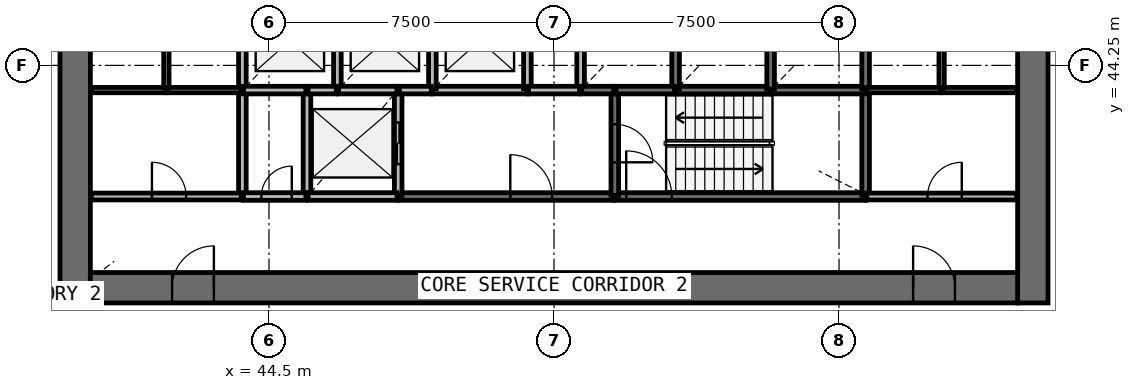
"""IFC4 building model, lengths in metres.
Left out: names, types, materials, properties, quantities, classifications, styles, units other than length and angle.
Written with IfcOpenShell. Run it as: python <this file> out.ifc"""

import sys

from ifc_helpers import new_model, si_unit, direction, frame, frame_2d, origin, place, context, subcontext, project, spatial, rectangle, extrude, source, transform, mapped, element, fill, save


model = new_model("IFC4")
c1 = context("Model", 3, precision=1e-05, world=origin(), true_north=direction((0.0, 1.0)))
c2 = subcontext(c1, "Body", "Model", "MODEL_VIEW")
j1 = project(units=[si_unit("LENGTHUNIT", "METRE"), si_unit("PLANEANGLEUNIT", "RADIAN")], contexts=[c1])
p1 = place(None, origin())
s1 = spatial("IfcSite", under=j1, at=p1, CompositionType="ELEMENT")
p2 = place(p1, origin())
s2 = spatial("IfcBuilding", under=s1, at=p2, CompositionType="ELEMENT")
p3 = place(p2, frame((0.0, 0.0, 79.8)))
s3 = spatial("IfcBuildingStorey", under=s2, at=p3, CompositionType="ELEMENT", Elevation=79.8)
p4 = place(p3, frame((64.6, 38.0, 0.0), z_axis=(0.0, 0.0, 1.0), x_axis=(0.0, 1.0, 0.0)))
e1 = element("IfcWall", 1, at=p4, inside=s3, PredefinedType="SHEAR", context=c2, shape_type="SweptSolid", body=[
    extrude(rectangle(XDim=20.0, YDim=0.8, at=frame_2d((10.0, 0.0))), origin(), (0.0, 0.0, 1.0), 4.1),
])
p5 = place(p4, frame((9.1, 0.0, 0.0)))
e2 = element("IfcOpeningElement", 2, at=p5, cuts=e1, PredefinedType="OPENING", context=c2, shape_type="SweptSolid", body=[
    extrude(rectangle(XDim=1.8, YDim=2.1, at=frame_2d((0.9, 1.05))), frame((0.0, 0.41, 0.0), z_axis=(0.0, -1.0, 0.0), x_axis=(1.0, 0.0, 0.0)), (0.0, 0.0, 1.0), 0.82),
])
p6 = place(p3, frame((39.4, 58.0, 0.0), z_axis=(0.0, 0.0, 1.0), x_axis=(0.0, -1.0, 0.0)))
e3 = element("IfcWall", 3, at=p6, inside=s3, PredefinedType="SHEAR", context=c2, shape_type="SweptSolid", body=[
    extrude(rectangle(XDim=20.0, YDim=0.8, at=frame_2d((10.0, 0.0))), origin(), (0.0, 0.0, 1.0), 4.1),
])
p7 = place(p6, frame((9.1, 0.0, 0.0)))
e4 = element("IfcOpeningElement", 4, at=p7, cuts=e3, PredefinedType="OPENING", context=c2, shape_type="SweptSolid", body=[
    extrude(rectangle(XDim=1.8, YDim=2.1, at=frame_2d((0.9, 1.05))), frame((0.0, 0.41, 0.0), z_axis=(0.0, -1.0, 0.0), x_axis=(1.0, 0.0, 0.0)), (0.0, 0.0, 1.0), 0.82),
])
p8 = place(p3, frame((39.8, 38.4, 0.0), z_axis=(0.0, 0.0, 1.0), x_axis=(1.0, 0.0, 0.0)))
e5 = element("IfcWall", 5, at=p8, inside=s3, PredefinedType="SHEAR", context=c2, shape_type="SweptSolid", body=[
    extrude(rectangle(XDim=24.4, YDim=0.8, at=frame_2d((12.2, 0.0))), origin(), (0.0, 0.0, 1.0), 4.1),
])
p9 = place(p8, frame((21.65, 0.0, 0.0)))
e6 = element("IfcOpeningElement", 6, at=p9, cuts=e5, PredefinedType="OPENING", context=c2, shape_type="SweptSolid", body=[
    extrude(rectangle(XDim=1.1, YDim=2.1, at=frame_2d((0.55, 1.05))), frame((0.0, 0.41, 0.0), z_axis=(0.0, -1.0, 0.0), x_axis=(1.0, 0.0, 0.0)), (0.0, 0.0, 1.0), 0.82),
])
p10 = place(p8, frame((2.15, 0.0, 0.0)))
e7 = element("IfcOpeningElement", 7, at=p10, cuts=e5, PredefinedType="OPENING", context=c2, shape_type="SweptSolid", body=[
    extrude(rectangle(XDim=1.1, YDim=2.1, at=frame_2d((0.55, 1.05))), frame((0.0, 0.41, 0.0), z_axis=(0.0, -1.0, 0.0), x_axis=(1.0, 0.0, 0.0)), (0.0, 0.0, 1.0), 0.82),
])
p11 = place(p3, frame((53.6, 40.8, 0.0), z_axis=(0.0, 0.0, 1.0), x_axis=(1.0, 0.0, 0.0)))
e8 = element("IfcWall", 8, at=p11, inside=s3, PredefinedType="SOLIDWALL", context=c2, shape_type="SweptSolid", body=[
    extrude(rectangle(XDim=6.6, YDim=0.2, at=frame_2d((3.3, 0.0))), origin(), (0.0, 0.0, 1.0), 3.7),
])
p12 = place(p11, frame((0.3, 0.0, 0.0)))
e9 = element("IfcOpeningElement", 9, at=p12, cuts=e8, PredefinedType="OPENING", context=c2, shape_type="SweptSolid", body=[
    extrude(rectangle(XDim=1.2, YDim=2.1, at=frame_2d((0.6, 1.05))), frame((0.0, 0.11, 0.0), z_axis=(0.0, -1.0, 0.0), x_axis=(1.0, 0.0, 0.0)), (0.0, 0.0, 1.0), 0.22),
])
p13 = place(p3, frame((47.9, 40.8, 0.0), z_axis=(0.0, 0.0, 1.0), x_axis=(1.0, 0.0, 0.0)))
e10 = element("IfcWall", 10, at=p13, inside=s3, PredefinedType="SOLIDWALL", context=c2, shape_type="SweptSolid", body=[
    extrude(rectangle(XDim=5.67, YDim=0.2, at=frame_2d((2.835, 0.0))), origin(), (0.0, 0.0, 1.0), 3.7),
])
p14 = place(p13, frame((2.95, 0.0, 0.0)))
e11 = element("IfcOpeningElement", 11, at=p14, cuts=e10, PredefinedType="OPENING", context=c2, shape_type="SweptSolid", body=[
    extrude(rectangle(XDim=1.1, YDim=2.1, at=frame_2d((0.55, 1.05))), frame((0.0, 0.11, 0.0), z_axis=(0.0, -1.0, 0.0), x_axis=(1.0, 0.0, 0.0)), (0.0, 0.0, 1.0), 0.22),
])
for number, where, z_axis, x_axis in (
    (12, (43.8, 43.6, 0.0), (0.0, 0.0, 1.0), (0.0, -1.0, 0.0)),
    (13, (45.5, 43.6, 0.0), (0.0, 0.0, 1.0), (0.0, -1.0, 0.0)),
):
    element("IfcWall", number, at=place(p3, frame(where, z_axis=z_axis, x_axis=x_axis)), inside=s3, PredefinedType="SOLIDWALL", context=c2, shape_type="SweptSolid", body=[
        extrude(rectangle(XDim=2.8, YDim=0.2, at=frame_2d((1.4, 0.0))), origin(), (0.0, 0.0, 1.0), 3.7),
    ])
p15 = place(p3, frame((47.9, 40.83, 0.0), z_axis=(0.0, 0.0, 1.0), x_axis=(0.0, 1.0, 0.0)))
e14 = element("IfcWall", 14, at=p15, inside=s3, PredefinedType="SOLIDWALL", context=c2, shape_type="SweptSolid", body=[
    extrude(rectangle(XDim=2.77, YDim=0.2, at=frame_2d((1.385, 0.0))), origin(), (0.0, 0.0, 1.0), 3.7),
])
p16 = place(p15, frame((0.82, 0.0, 0.0)))
e15 = element("IfcOpeningElement", 15, at=p16, cuts=e14, PredefinedType="OPENING", context=c2, shape_type="SweptSolid", body=[
    extrude(rectangle(XDim=1.1, YDim=2.1, at=frame_2d((0.55, 1.05))), frame((0.0, 0.11, 0.0), z_axis=(0.0, -1.0, 0.0), x_axis=(1.0, 0.0, 0.0)), (0.0, 0.0, 1.0), 0.22),
])
p17 = place(p3, frame((60.2, 40.83, 0.0), z_axis=(0.0, 0.0, 1.0), x_axis=(0.0, 1.0, 0.0)))
e16 = element("IfcWall", 16, at=p17, inside=s3, PredefinedType="SOLIDWALL", context=c2, shape_type="SweptSolid", body=[
    extrude(rectangle(XDim=2.77, YDim=0.2, at=frame_2d((1.385, 0.0))), origin(), (0.0, 0.0, 1.0), 3.7),
])
p18 = place(p3, frame((53.6, 43.6, 0.0), z_axis=(0.0, 0.0, 1.0), x_axis=(0.0, -1.0, 0.0)))
e17 = element("IfcWall", 17, at=p18, inside=s3, PredefinedType="SOLIDWALL", context=c2, shape_type="SweptSolid", body=[
    extrude(rectangle(XDim=2.77, YDim=0.2, at=frame_2d((1.385, 0.0))), origin(), (0.0, 0.0, 1.0), 3.7),
])
p19 = place(p18, frame((0.9, 0.0, 0.0)))
e18 = element("IfcOpeningElement", 18, at=p19, cuts=e17, PredefinedType="OPENING", context=c2, shape_type="SweptSolid", body=[
    extrude(rectangle(XDim=1.0, YDim=2.1, at=frame_2d((0.5, 1.05))), frame((0.0, 0.11, 0.0), z_axis=(0.0, -1.0, 0.0), x_axis=(1.0, 0.0, 0.0)), (0.0, 0.0, 1.0), 0.22),
])
for number, where, z_axis, x_axis in (
    (19, (48.8, 43.6, 0.0), (0.0, 0.0, 1.0), (1.0, 0.0, 0.0)),
    (20, (55.2, 43.6, 0.0), (0.0, 0.0, 1.0), (1.0, 0.0, 0.0)),
):
    element("IfcWall", number, at=place(p3, frame(where, z_axis=z_axis, x_axis=x_axis)), inside=s3, PredefinedType="SOLIDWALL", context=c2, shape_type="SweptSolid", body=[
        extrude(rectangle(XDim=2.5, YDim=0.2, at=frame_2d((1.25, 0.0))), origin(), (0.0, 0.0, 1.0), 3.7),
    ])
p20 = place(p3, frame((57.73, 43.6, 0.0), z_axis=(0.0, 0.0, 1.0), x_axis=(1.0, 0.0, 0.0)))
e21 = element("IfcWall", 21, at=p20, inside=s3, PredefinedType="SOLIDWALL", context=c2, shape_type="SweptSolid", body=[
    extrude(rectangle(XDim=2.44, YDim=0.2, at=frame_2d((1.22, 0.0))), origin(), (0.0, 0.0, 1.0), 3.7),
])
p21 = place(p3, frame((45.53, 40.8, 0.0), z_axis=(0.0, 0.0, 1.0), x_axis=(1.0, 0.0, 0.0)))
e22 = element("IfcWall", 22, at=p21, inside=s3, PredefinedType="SOLIDWALL", context=c2, shape_type="SweptSolid", body=[
    extrude(rectangle(XDim=2.34, YDim=0.2, at=frame_2d((1.17, 0.0))), origin(), (0.0, 0.0, 1.0), 3.7),
])
p22 = place(p3, frame((43.8, 45.99, 0.0), z_axis=(0.0, 0.0, 1.0), x_axis=(0.0, -1.0, 0.0)))
e23 = element("IfcWall", 23, at=p22, inside=s3, PredefinedType="SOLIDWALL", context=c2, shape_type="SweptSolid", body=[
    extrude(rectangle(XDim=2.36, YDim=0.2, at=frame_2d((1.18, 0.0))), origin(), (0.0, 0.0, 1.0), 3.7),
])
p23 = place(p3, frame((46.3, 43.6, 0.0), z_axis=(0.0, 0.0, 1.0), x_axis=(0.0, 1.0, 0.0)))
e24 = element("IfcWall", 24, at=p23, inside=s3, PredefinedType="SOLIDWALL", context=c2, shape_type="SweptSolid", body=[
    extrude(rectangle(XDim=2.39, YDim=0.2, at=frame_2d((1.195, 0.0))), origin(), (0.0, 0.0, 1.0), 3.7),
])
for number, where, z_axis, x_axis in (
    (25, (48.8, 43.63, 0.0), (0.0, 0.0, 1.0), (0.0, 1.0, 0.0)),
    (26, (51.3, 43.63, 0.0), (0.0, 0.0, 1.0), (0.0, 1.0, 0.0)),
):
    element("IfcWall", number, at=place(p3, frame(where, z_axis=z_axis, x_axis=x_axis)), inside=s3, PredefinedType="SOLIDWALL", context=c2, shape_type="SweptSolid", body=[
        extrude(rectangle(XDim=2.36, YDim=0.2, at=frame_2d((1.18, 0.0))), origin(), (0.0, 0.0, 1.0), 3.7),
    ])
p24 = place(p3, frame((52.7, 45.99, 0.0), z_axis=(0.0, 0.0, 1.0), x_axis=(0.0, -1.0, 0.0)))
e27 = element("IfcWall", 27, at=p24, inside=s3, PredefinedType="SOLIDWALL", context=c2, shape_type="SweptSolid", body=[
    extrude(rectangle(XDim=2.39, YDim=0.2, at=frame_2d((1.195, 0.0))), origin(), (0.0, 0.0, 1.0), 3.7),
])
for number, where, z_axis, x_axis in (
    (28, (55.2, 43.63, 0.0), (0.0, 0.0, 1.0), (0.0, 1.0, 0.0)),
    (29, (57.7, 43.63, 0.0), (0.0, 0.0, 1.0), (0.0, 1.0, 0.0)),
    (30, (60.2, 43.63, 0.0), (0.0, 0.0, 1.0), (0.0, 1.0, 0.0)),
):
    element("IfcWall", number, at=place(p3, frame(where, z_axis=z_axis, x_axis=x_axis)), inside=s3, PredefinedType="SOLIDWALL", context=c2, shape_type="SweptSolid", body=[
        extrude(rectangle(XDim=2.36, YDim=0.2, at=frame_2d((1.18, 0.0))), origin(), (0.0, 0.0, 1.0), 3.7),
    ])
p25 = place(p3, frame((43.83, 43.6, 0.0), z_axis=(0.0, 0.0, 1.0), x_axis=(1.0, 0.0, 0.0)))
e31 = element("IfcWall", 31, at=p25, inside=s3, PredefinedType="SOLIDWALL", context=c2, shape_type="SweptSolid", body=[
    extrude(rectangle(XDim=1.64, YDim=0.2, at=frame_2d((0.82, 0.0))), origin(), (0.0, 0.0, 1.0), 3.7),
])
p26 = place(p3, frame((43.83, 40.8, 0.0), z_axis=(0.0, 0.0, 1.0), x_axis=(1.0, 0.0, 0.0)))
e32 = element("IfcWall", 32, at=p26, inside=s3, PredefinedType="SOLIDWALL", context=c2, shape_type="SweptSolid", body=[
    extrude(rectangle(XDim=1.64, YDim=0.2, at=frame_2d((0.82, 0.0))), origin(), (0.0, 0.0, 1.0), 3.7),
])
p27 = place(p26, frame((0.47, 0.0, 0.0)))
e33 = element("IfcOpeningElement", 33, at=p27, cuts=e32, PredefinedType="OPENING", context=c2, shape_type="SweptSolid", body=[
    extrude(rectangle(XDim=0.8, YDim=2.1, at=frame_2d((0.4, 1.05))), frame((0.0, 0.11, 0.0), z_axis=(0.0, -1.0, 0.0), x_axis=(1.0, 0.0, 0.0)), (0.0, 0.0, 1.0), 0.22),
])
for number, where, z_axis, x_axis in (
    (34, (46.33, 43.6, 0.0), (0.0, 0.0, 1.0), (1.0, 0.0, 0.0)),
    (35, (53.63, 43.6, 0.0), (0.0, 0.0, 1.0), (1.0, 0.0, 0.0)),
):
    element("IfcWall", number, at=place(p3, frame(where, z_axis=z_axis, x_axis=x_axis)), inside=s3, PredefinedType="SOLIDWALL", context=c2, shape_type="SweptSolid", body=[
        extrude(rectangle(XDim=1.54, YDim=0.2, at=frame_2d((0.77, 0.0))), origin(), (0.0, 0.0, 1.0), 3.7),
    ])
p28 = place(p3, frame((52.67, 43.6, 0.0), z_axis=(0.0, 0.0, 1.0), x_axis=(-1.0, 0.0, 0.0)))
e36 = element("IfcWall", 36, at=p28, inside=s3, PredefinedType="SOLIDWALL", context=c2, shape_type="SweptSolid", body=[
    extrude(rectangle(XDim=1.34, YDim=0.2, at=frame_2d((0.67, 0.0))), origin(), (0.0, 0.0, 1.0), 3.7),
])
for number, where, z_axis, x_axis in (
    (37, (47.93, 43.6, 0.0), (0.0, 0.0, 1.0), (1.0, 0.0, 0.0)),
    (38, (52.73, 43.6, 0.0), (0.0, 0.0, 1.0), (1.0, 0.0, 0.0)),
):
    element("IfcWall", number, at=place(p3, frame(where, z_axis=z_axis, x_axis=x_axis)), inside=s3, PredefinedType="SOLIDWALL", context=c2, shape_type="SweptSolid", body=[
        extrude(rectangle(XDim=0.84, YDim=0.2, at=frame_2d((0.42, 0.0))), origin(), (0.0, 0.0, 1.0), 3.7),
    ])
p29 = place(p3, frame((45.53, 43.6, 0.0), z_axis=(0.0, 0.0, 1.0), x_axis=(1.0, 0.0, 0.0)))
e39 = element("IfcWall", 39, at=p29, inside=s3, PredefinedType="SOLIDWALL", context=c2, shape_type="SweptSolid", body=[
    extrude(rectangle(XDim=0.74, YDim=0.2, at=frame_2d((0.37, 0.0))), origin(), (0.0, 0.0, 1.0), 3.7),
])
p30 = place(p3, frame((60.23, 40.8, 0.0), z_axis=(0.0, 0.0, 1.0), x_axis=(1.0, 0.0, 0.0)))
e40 = element("IfcWall", 40, at=p30, inside=s3, PredefinedType="PARTITIONING", context=c2, shape_type="SweptSolid", body=[
    extrude(rectangle(XDim=3.95, YDim=0.18, at=frame_2d((1.975, 0.0))), origin(), (0.0, 0.0, 1.0), 3.7),
])
p31 = place(p30, frame((1.6, 0.0, 0.0)))
e41 = element("IfcOpeningElement", 41, at=p31, cuts=e40, PredefinedType="OPENING", context=c2, shape_type="SweptSolid", body=[
    extrude(rectangle(XDim=0.9, YDim=2.1, at=frame_2d((0.45, 1.05))), frame((0.0, 0.1, 0.0), z_axis=(0.0, -1.0, 0.0), x_axis=(1.0, 0.0, 0.0)), (0.0, 0.0, 1.0), 0.2),
])
p32 = place(p3, frame((39.82, 40.8, 0.0), z_axis=(0.0, 0.0, 1.0), x_axis=(1.0, 0.0, 0.0)))
e42 = element("IfcWall", 42, at=p32, inside=s3, PredefinedType="PARTITIONING", context=c2, shape_type="SweptSolid", body=[
    extrude(rectangle(XDim=3.95, YDim=0.18, at=frame_2d((1.975, 0.0))), origin(), (0.0, 0.0, 1.0), 3.7),
])
p33 = place(p32, frame((1.6, 0.0, 0.0)))
e43 = element("IfcOpeningElement", 43, at=p33, cuts=e42, PredefinedType="OPENING", context=c2, shape_type="SweptSolid", body=[
    extrude(rectangle(XDim=0.9, YDim=2.1, at=frame_2d((0.45, 1.05))), frame((0.0, 0.1, 0.0), z_axis=(0.0, -1.0, 0.0), x_axis=(1.0, 0.0, 0.0)), (0.0, 0.0, 1.0), 0.2),
])
for number, where, z_axis, x_axis in (
    (44, (41.8, 43.6, 0.0), (0.0, 0.0, 1.0), (0.0, 1.0, 0.0)),
    (45, (62.2, 43.6, 0.0), (0.0, 0.0, 1.0), (0.0, 1.0, 0.0)),
):
    element("IfcWall", number, at=place(p3, frame(where, z_axis=z_axis, x_axis=x_axis)), inside=s3, PredefinedType="PARTITIONING", context=c2, shape_type="SweptSolid", body=[
        extrude(rectangle(XDim=2.39, YDim=0.14, at=frame_2d((1.195, 0.0))), origin(), (0.0, 0.0, 1.0), 2.9),
    ])
for number, where, z_axis, x_axis in (
    (46, (43.77, 43.6, 0.0), (0.0, 0.0, 1.0), (-1.0, 0.0, 0.0)),
    (47, (60.23, 43.6, 0.0), (0.0, 0.0, 1.0), (1.0, 0.0, 0.0)),
):
    element("IfcWall", number, at=place(p3, frame(where, z_axis=z_axis, x_axis=x_axis)), inside=s3, PredefinedType="PARTITIONING", context=c2, shape_type="SweptSolid", body=[
        extrude(rectangle(XDim=1.94, YDim=0.14, at=frame_2d((0.97, 0.0))), origin(), (0.0, 0.0, 1.0), 2.9),
    ])
for number, where, z_axis, x_axis in (
    (48, (62.23, 43.6, 0.0), (0.0, 0.0, 1.0), (1.0, 0.0, 0.0)),
    (49, (41.77, 43.6, 0.0), (0.0, 0.0, 1.0), (-1.0, 0.0, 0.0)),
):
    element("IfcWall", number, at=place(p3, frame(where, z_axis=z_axis, x_axis=x_axis)), inside=s3, PredefinedType="PARTITIONING", context=c2, shape_type="SweptSolid", body=[
        extrude(rectangle(XDim=1.95, YDim=0.14, at=frame_2d((0.975, 0.0))), origin(), (0.0, 0.0, 1.0), 2.9),
    ])
m1 = source(origin(), c2, "Body", "SweptSolid", [
    extrude(rectangle(XDim=1.1, YDim=2.1, at=frame_2d((0.55, 1.05))), frame((0.0, 0.025, 0.0), z_axis=(0.0, -1.0, 0.0), x_axis=(1.0, 0.0, 0.0)), (0.0, 0.0, 1.0), 0.05),
])
p34 = place(p16, origin())
e50 = element("IfcDoor", 50, at=p34, inside=s3, OperationType="DOUBLE_DOOR_SLIDING", PredefinedType="USERDEFINED", context=c2, shape_type="MappedRepresentation", body=[
    mapped(m1, transform((0.0, 0.0, 0.0), scale=1.0)),
])
fill(e15, e50)
m2 = source(origin(), c2, "Body", "SweptSolid", [
    extrude(rectangle(XDim=1.2, YDim=2.1, at=frame_2d((0.6, 1.05))), frame((0.0, 0.025, 0.0), z_axis=(0.0, -1.0, 0.0), x_axis=(1.0, 0.0, 0.0)), (0.0, 0.0, 1.0), 0.05),
])
p35 = place(p12, origin())
e51 = element("IfcDoor", 51, at=p35, inside=s3, OperationType="SINGLE_SWING_LEFT", PredefinedType="DOOR", context=c2, shape_type="MappedRepresentation", body=[
    mapped(m2, transform((0.0, 0.0, 0.0), scale=1.0)),
])
fill(e9, e51)
m3 = source(origin(), c2, "Body", "SweptSolid", [
    extrude(rectangle(XDim=1.0, YDim=2.1, at=frame_2d((0.5, 1.05))), frame((0.0, 0.025, 0.0), z_axis=(0.0, -1.0, 0.0), x_axis=(1.0, 0.0, 0.0)), (0.0, 0.0, 1.0), 0.05),
])
p36 = place(p19, origin())
e52 = element("IfcDoor", 52, at=p36, inside=s3, OperationType="SINGLE_SWING_RIGHT", PredefinedType="DOOR", context=c2, shape_type="MappedRepresentation", body=[
    mapped(m3, transform((0.0, 0.0, 0.0), scale=1.0)),
])
fill(e18, e52)
m4 = source(origin(), c2, "Body", "SweptSolid", [
    extrude(rectangle(XDim=1.1, YDim=2.1, at=frame_2d((0.55, 1.05))), frame((0.0, 0.025, 0.0), z_axis=(0.0, -1.0, 0.0), x_axis=(1.0, 0.0, 0.0)), (0.0, 0.0, 1.0), 0.05),
])
p37 = place(p14, origin())
e53 = element("IfcDoor", 53, at=p37, inside=s3, OperationType="SINGLE_SWING_LEFT", PredefinedType="DOOR", context=c2, shape_type="MappedRepresentation", body=[
    mapped(m4, transform((0.0, 0.0, 0.0), scale=1.0)),
])
fill(e11, e53)
m5 = source(origin(), c2, "Body", "SweptSolid", [
    extrude(rectangle(XDim=0.8, YDim=2.1, at=frame_2d((0.4, 1.05))), frame((0.0, 0.025, 0.0), z_axis=(0.0, -1.0, 0.0), x_axis=(1.0, 0.0, 0.0)), (0.0, 0.0, 1.0), 0.05),
])
p38 = place(p27, origin())
e54 = element("IfcDoor", 54, at=p38, inside=s3, OperationType="SINGLE_SWING_RIGHT", PredefinedType="DOOR", context=c2, shape_type="MappedRepresentation", body=[
    mapped(m5, transform((0.0, 0.0, 0.0), scale=1.0)),
])
fill(e33, e54)
m6 = source(origin(), c2, "Body", "SweptSolid", [
    extrude(rectangle(XDim=1.1, YDim=2.1, at=frame_2d((0.55, 1.05))), frame((0.0, 0.025, 0.0), z_axis=(0.0, -1.0, 0.0), x_axis=(1.0, 0.0, 0.0)), (0.0, 0.0, 1.0), 0.05),
])
p39 = place(p9, origin())
e55 = element("IfcDoor", 55, at=p39, inside=s3, OperationType="SINGLE_SWING_LEFT", PredefinedType="DOOR", context=c2, shape_type="MappedRepresentation", body=[
    mapped(m6, transform((0.0, 0.0, 0.0), scale=1.0)),
])
fill(e6, e55)
p40 = place(p10, origin())
e56 = element("IfcDoor", 56, at=p40, inside=s3, OperationType="SINGLE_SWING_RIGHT", PredefinedType="DOOR", context=c2, shape_type="MappedRepresentation", body=[
    mapped(m6, transform((0.0, 0.0, 0.0), scale=1.0)),
])
fill(e7, e56)
m7 = source(origin(), c2, "Body", "SweptSolid", [
    extrude(rectangle(XDim=0.9, YDim=2.1, at=frame_2d((0.45, 1.05))), frame((0.0, 0.025, 0.0), z_axis=(0.0, -1.0, 0.0), x_axis=(1.0, 0.0, 0.0)), (0.0, 0.0, 1.0), 0.05),
])
p41 = place(p33, origin())
e57 = element("IfcDoor", 57, at=p41, inside=s3, OperationType="SINGLE_SWING_LEFT", PredefinedType="DOOR", context=c2, shape_type="MappedRepresentation", body=[
    mapped(m7, transform((0.0, 0.0, 0.0), scale=1.0)),
])
fill(e43, e57)
p42 = place(p31, origin())
e58 = element("IfcDoor", 58, at=p42, inside=s3, OperationType="SINGLE_SWING_RIGHT", PredefinedType="DOOR", context=c2, shape_type="MappedRepresentation", body=[
    mapped(m7, transform((0.0, 0.0, 0.0), scale=1.0)),
])
fill(e41, e58)
save(model, sys.argv[1])
